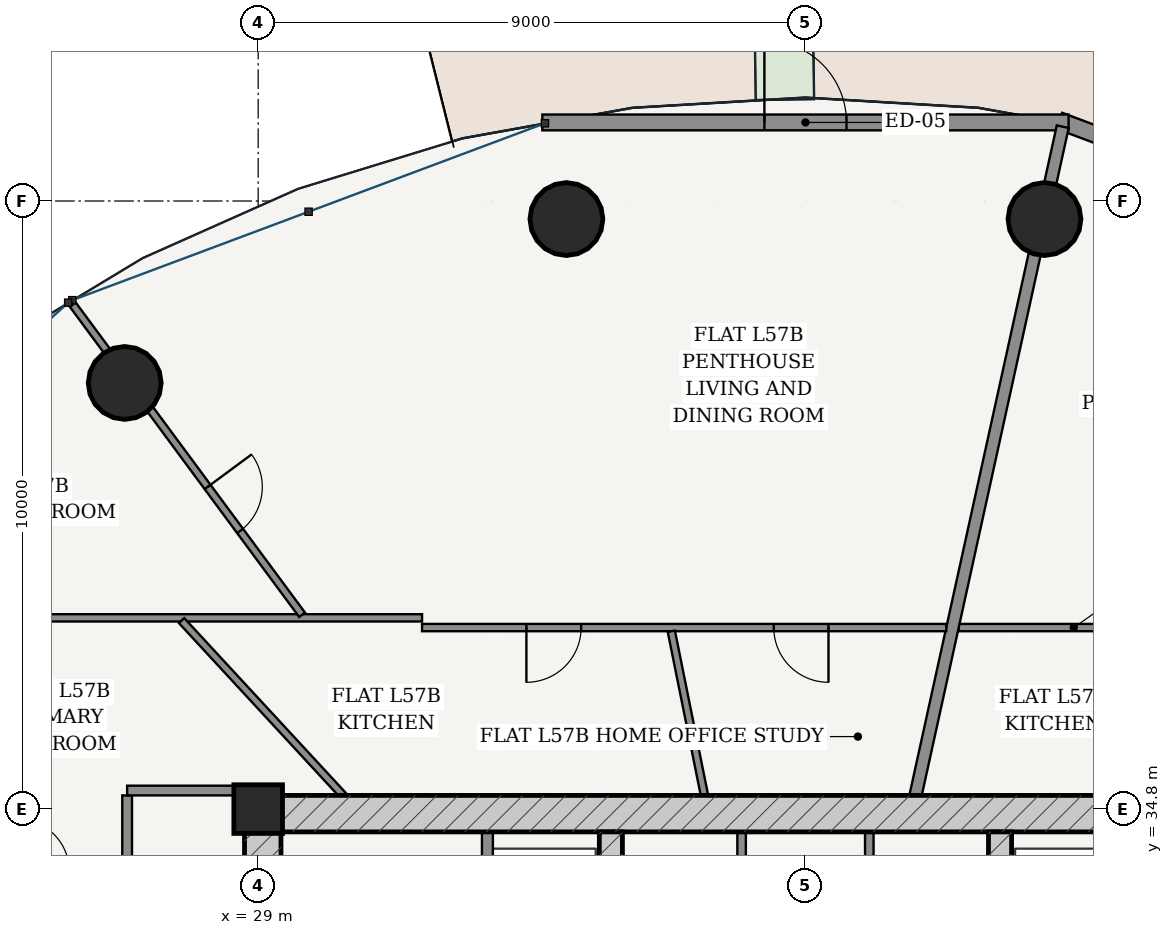
"""IFC4 building model, lengths in metres.
Left out: names, types, materials, properties, quantities, classifications, styles, units other than length and angle.
Written with IfcOpenShell. Run it as: python <this file> out.ifc"""

import sys

from ifc_helpers import new_model, si_unit, direction, frame, frame_2d, origin, origin_2d, place, context, subcontext, project, spatial, rectangle, hollow_circle, extrude, source, transform, mapped, element, fill, save


model = new_model("IFC4")
c1 = context("Model", 3, precision=1e-05, world=origin(), true_north=direction((-0.2419218956, 0.970295726276)))
c2 = subcontext(c1, "Body", "Model", "MODEL_VIEW")
j1 = project(units=[si_unit("LENGTHUNIT", "METRE"), si_unit("PLANEANGLEUNIT", "RADIAN")], contexts=[c1])
p1 = place(None, origin())
s1 = spatial("IfcSite", under=j1, at=p1, CompositionType="ELEMENT")
p2 = place(p1, origin())
s2 = spatial("IfcBuilding", under=s1, at=p2, CompositionType="ELEMENT")
p3 = place(p2, frame((0.0, 0.0, 217.1)))
s3 = spatial("IfcBuildingStorey", under=s2, at=p3, CompositionType="ELEMENT", Elevation=217.1)
p4 = place(p3, frame((29.0, 34.8, 0.0), z_axis=(0.0, 0.0, 1.0), x_axis=(1.0, 0.0, 0.0)))
e1 = element("IfcColumn", 1, at=p4, inside=s3, PredefinedType="COLUMN", context=c2, shape_type="SweptSolid", body=[
    extrude(rectangle(XDim=0.8, YDim=0.8, at=origin_2d()), origin(), (0.0, 0.0, 1.0), 3.7),
])
p5 = place(p3, frame((28.775, 34.725, 0.0), z_axis=(0.0, 0.0, 1.0), x_axis=(1.0, 0.0, 0.0)))
e2 = element("IfcWall", 2, at=p5, inside=s3, PredefinedType="SHEAR", context=c2, shape_type="SweptSolid", body=[
    extrude(rectangle(XDim=18.45, YDim=0.6, at=frame_2d((9.225, 0.0))), origin(), (0.0, 0.0, 1.0), 3.435),
])
p6 = place(p3, frame((29.075, 19.175, 0.0), z_axis=(0.0, 0.0, 1.0), x_axis=(0.0, 1.0, 0.0)))
e3 = element("IfcWall", 3, at=p6, inside=s3, PredefinedType="SHEAR", context=c2, shape_type="SweptSolid", body=[
    extrude(rectangle(XDim=15.25, YDim=0.6, at=frame_2d((7.625, 0.0))), origin(), (0.0, 0.0, 1.0), 3.435),
])
p7 = place(p6, frame((9.875, 0.0, 0.0)))
e4 = element("IfcOpeningElement", 4, at=p7, cuts=e3, PredefinedType="OPENING", context=c2, shape_type="SweptSolid", body=[
    extrude(rectangle(XDim=1.5, YDim=2.2, at=frame_2d((0.75, 1.1))), frame((0.0, 0.31, 0.0), z_axis=(0.0, -1.0, 0.0), x_axis=(1.0, 0.0, 0.0)), (0.0, 0.0, 1.0), 0.62),
])
p8 = place(p3, frame((34.8, 19.175, 0.0), z_axis=(0.0, 0.0, 1.0), x_axis=(0.0, 1.0, 0.0)))
e5 = element("IfcWall", 5, at=p8, inside=s3, PredefinedType="SHEAR", context=c2, shape_type="SweptSolid", body=[
    extrude(rectangle(XDim=15.25, YDim=0.38, at=frame_2d((7.625, 0.0))), origin(), (0.0, 0.0, 1.0), 3.435),
])
p9 = place(p8, frame((7.8, 0.0, 0.0)))
e6 = element("IfcOpeningElement", 6, at=p9, cuts=e5, PredefinedType="OPENING", context=c2, shape_type="SweptSolid", body=[
    extrude(rectangle(XDim=1.05, YDim=2.15, at=frame_2d((0.525, 1.075))), frame((0.0, 0.2, 0.0), z_axis=(0.0, -1.0, 0.0), x_axis=(1.0, 0.0, 0.0)), (0.0, 0.0, 1.0), 0.4),
])
p10 = place(p3, frame((41.2, 19.175, 0.0), z_axis=(0.0, 0.0, 1.0), x_axis=(0.0, 1.0, 0.0)))
e7 = element("IfcWall", 7, at=p10, inside=s3, PredefinedType="SHEAR", context=c2, shape_type="SweptSolid", body=[
    extrude(rectangle(XDim=15.25, YDim=0.38, at=frame_2d((7.625, 0.0))), origin(), (0.0, 0.0, 1.0), 3.435),
])
p11 = place(p10, frame((7.8, 0.0, 0.0)))
e8 = element("IfcOpeningElement", 8, at=p11, cuts=e7, PredefinedType="OPENING", context=c2, shape_type="SweptSolid", body=[
    extrude(rectangle(XDim=1.05, YDim=2.15, at=frame_2d((0.525, 1.075))), frame((0.0, 0.2, 0.0), z_axis=(0.0, -1.0, 0.0), x_axis=(1.0, 0.0, 0.0)), (0.0, 0.0, 1.0), 0.4),
])
for number, where, z_axis, x_axis in (
    (9, (41.931, 44.503, 0.0), (0.0, 0.0, 1.0), (1.0, 0.0, 0.0)),
    (10, (34.069, 44.503, 0.0), (0.0, 0.0, 1.0), (1.0, 0.0, 0.0)),
    (11, (26.805, 41.808, 0.0), (0.0, 0.0, 1.0), (1.0, 0.0, 0.0)),
):
    element("IfcColumn", number, at=place(p3, frame(where, z_axis=z_axis, x_axis=x_axis)), inside=s3, PredefinedType="COLUMN", context=c2, shape_type="SweptSolid", body=[
        extrude(hollow_circle(Radius=0.6, WallThickness=0.038, at=origin_2d()), origin(), (0.0, 0.0, 1.0), 3.7),
    ])
p12 = place(p3, frame((50.17, 43.127, 0.0), z_axis=(0.0, 0.0, 1.0), x_axis=(-0.936556918375, 0.350515532672, 0.0)))
e12 = element("IfcWall", 12, at=p12, inside=s3, PredefinedType="SOLIDWALL", context=c2, shape_type="SweptSolid", body=[
    extrude(rectangle(XDim=8.539, YDim=0.28, at=frame_2d((4.27, 0.0))), origin(), (0.0, 0.0, 1.0), 3.435),
])
p13 = place(p12, frame((1.256, 0.0, 0.85)))
e13 = element("IfcOpeningElement", 13, at=p13, cuts=e12, PredefinedType="OPENING", context=c2, shape_type="SweptSolid", body=[
    extrude(rectangle(XDim=2.1, YDim=1.95, at=frame_2d((1.05, 0.975))), frame((0.0, 0.15, 0.0), z_axis=(0.0, -1.0, 0.0), x_axis=(1.0, 0.0, 0.0)), (0.0, 0.0, 1.0), 0.3),
])
p14 = place(p12, frame((5.184, 0.0, 0.85)))
e14 = element("IfcOpeningElement", 14, at=p14, cuts=e12, PredefinedType="OPENING", context=c2, shape_type="SweptSolid", body=[
    extrude(rectangle(XDim=2.1, YDim=1.95, at=frame_2d((1.05, 0.975))), frame((0.0, 0.15, 0.0), z_axis=(0.0, -1.0, 0.0), x_axis=(1.0, 0.0, 0.0)), (0.0, 0.0, 1.0), 0.3),
])
p15 = place(p3, frame((42.327, 46.092, 0.0), z_axis=(0.0, 0.0, 1.0), x_axis=(-1.0, 0.0, 0.0)))
e15 = element("IfcWall", 15, at=p15, inside=s3, PredefinedType="SOLIDWALL", context=c2, shape_type="SweptSolid", body=[
    extrude(rectangle(XDim=8.654, YDim=0.26, at=frame_2d((4.327, 0.0))), origin(), (0.0, 0.0, 1.0), 3.435),
])
p16 = place(p15, frame((3.652, 0.0, 0.0)))
e16 = element("IfcOpeningElement", 16, at=p16, cuts=e15, PredefinedType="OPENING", context=c2, shape_type="SweptSolid", body=[
    extrude(rectangle(XDim=1.35, YDim=2.2, at=frame_2d((0.675, 1.1))), frame((0.0, 0.14, 0.0), z_axis=(0.0, -1.0, 0.0), x_axis=(1.0, 0.0, 0.0)), (0.0, 0.0, 1.0), 0.28),
])
p17 = place(p3, frame((32.77, 28.52, 0.0), z_axis=(0.0, 0.0, 1.0), x_axis=(0.0, 1.0, 0.0)))
e17 = element("IfcWall", 17, at=p17, inside=s3, PredefinedType="PARTITIONING", context=c2, shape_type="SweptSolid", body=[
    extrude(rectangle(XDim=5.905, YDim=0.18, at=frame_2d((2.953, 0.0))), origin(), (0.0, 0.0, 1.0), 3.435),
])
p18 = place(p17, frame((3.655, 0.0, 0.0)))
e18 = element("IfcOpeningElement", 18, at=p18, cuts=e17, PredefinedType="OPENING", context=c2, shape_type="SweptSolid", body=[
    extrude(rectangle(XDim=1.15, YDim=2.2, at=frame_2d((0.575, 1.1))), frame((0.0, 0.1, 0.0), z_axis=(0.0, -1.0, 0.0), x_axis=(1.0, 0.0, 0.0)), (0.0, 0.0, 1.0), 0.2),
])
p19 = place(p17, frame((0.73, 0.0, 0.0)))
e19 = element("IfcOpeningElement", 19, at=p19, cuts=e17, PredefinedType="OPENING", context=c2, shape_type="SweptSolid", body=[
    extrude(rectangle(XDim=1.2, YDim=2.25, at=frame_2d((0.6, 1.125))), frame((0.0, 0.1, 0.0), z_axis=(0.0, -1.0, 0.0), x_axis=(1.0, 0.0, 0.0)), (0.0, 0.0, 1.0), 0.2),
])
for number, where, z_axis, x_axis in (
    (20, (36.95, 28.56, 0.0), (0.0, 0.0, 1.0), (0.0, 1.0, 0.0)),
    (21, (39.05, 28.56, 0.0), (0.0, 0.0, 1.0), (0.0, 1.0, 0.0)),
):
    element("IfcWall", number, at=place(p3, frame(where, z_axis=z_axis, x_axis=x_axis)), inside=s3, PredefinedType="PARTITIONING", context=c2, shape_type="SweptSolid", body=[
        extrude(rectangle(XDim=5.865, YDim=0.14, at=frame_2d((2.933, 0.0))), origin(), (0.0, 0.0, 1.0), 3.435),
    ])
p20 = place(p3, frame((26.845, 24.4, 0.0), z_axis=(0.0, 0.0, 1.0), x_axis=(0.0, 1.0, 0.0)))
e22 = element("IfcWall", 22, at=p20, inside=s3, PredefinedType="PARTITIONING", context=c2, shape_type="SweptSolid", body=[
    extrude(rectangle(XDim=10.625, YDim=0.16, at=frame_2d((5.312, 0.0))), origin(), (0.0, 0.0, 1.0), 2.951),
])
p21 = place(p20, frame((4.936, 0.0, 0.0)))
e23 = element("IfcOpeningElement", 23, at=p21, cuts=e22, PredefinedType="OPENING", context=c2, shape_type="SweptSolid", body=[
    extrude(rectangle(XDim=0.98, YDim=2.2, at=frame_2d((0.49, 1.1))), frame((0.0, 0.09, 0.0), z_axis=(0.0, -1.0, 0.0), x_axis=(1.0, 0.0, 0.0)), (0.0, 0.0, 1.0), 0.18),
])
p22 = place(p3, frame((26.845, 35.105, 0.0), z_axis=(0.0, 0.0, 1.0), x_axis=(1.0, 0.0, 0.0)))
e24 = element("IfcWall", 24, at=p22, inside=s3, PredefinedType="PARTITIONING", context=c2, shape_type="SweptSolid", body=[
    extrude(rectangle(XDim=1.93, YDim=0.16, at=frame_2d((0.965, 0.0))), origin(), (0.0, 0.0, 1.0), 3.435),
])
p23 = place(p3, frame((40.52, 37.785, 0.0), z_axis=(0.0, 0.0, 1.0), x_axis=(1.0, 0.0, 0.0)))
e25 = element("IfcWall", 25, at=p23, inside=s3, PredefinedType="PARTITIONING", context=c2, shape_type="SweptSolid", body=[
    extrude(rectangle(XDim=3.785, YDim=0.12, at=frame_2d((1.893, 0.0))), origin(), (0.0, 0.0, 1.0), 2.951),
])
p24 = place(p3, frame((39.811, 35.027, 0.0), z_axis=(0.0, 0.0, 1.0), x_axis=(0.214966857327, 0.976621344356, 0.0)))
e26 = element("IfcWall", 26, at=p24, inside=s3, PredefinedType="PARTITIONING", context=c2, shape_type="SweptSolid", body=[
    extrude(rectangle(XDim=11.258, YDim=0.2, at=frame_2d((5.629, 0.0))), origin(), (0.0, 0.0, 1.0), 2.52),
])
p25 = place(p3, frame((24.005, 37.945, 0.0), z_axis=(0.0, 0.0, 1.0), x_axis=(1.0, 0.0, 0.0)))
e27 = element("IfcWall", 27, at=p25, inside=s3, PredefinedType="PARTITIONING", context=c2, shape_type="SweptSolid", body=[
    extrude(rectangle(XDim=7.69, YDim=0.12, at=frame_2d((3.845, 0.0))), origin(), (0.0, 0.0, 1.0), 2.951),
])
p26 = place(p3, frame((31.695, 37.785, 0.0), z_axis=(0.0, 0.0, 1.0), x_axis=(1.0, 0.0, 0.0)))
e28 = element("IfcWall", 28, at=p26, inside=s3, PredefinedType="PARTITIONING", context=c2, shape_type="SweptSolid", body=[
    extrude(rectangle(XDim=8.621, YDim=0.12, at=frame_2d((4.311, 0.0))), origin(), (0.0, 0.0, 1.0), 2.951),
])
p27 = place(p26, frame((1.716, 0.0, 0.0)))
e29 = element("IfcOpeningElement", 29, at=p27, cuts=e28, PredefinedType="OPENING", context=c2, shape_type="SweptSolid", body=[
    extrude(rectangle(XDim=0.9, YDim=2.15, at=frame_2d((0.45, 1.075))), frame((0.0, 0.07, 0.0), z_axis=(0.0, -1.0, 0.0), x_axis=(1.0, 0.0, 0.0)), (0.0, 0.0, 1.0), 0.14),
])
p28 = place(p26, frame((5.784, 0.0, 0.0)))
e30 = element("IfcOpeningElement", 30, at=p28, cuts=e28, PredefinedType="OPENING", context=c2, shape_type="SweptSolid", body=[
    extrude(rectangle(XDim=0.9, YDim=2.15, at=frame_2d((0.45, 1.075))), frame((0.0, 0.07, 0.0), z_axis=(0.0, -1.0, 0.0), x_axis=(1.0, 0.0, 0.0)), (0.0, 0.0, 1.0), 0.14),
])
p29 = place(p3, frame((29.722, 37.995, 0.0), z_axis=(0.0, 0.0, 1.0), x_axis=(-0.594518724985, 0.80408176552, 0.0)))
e31 = element("IfcWall", 31, at=p29, inside=s3, PredefinedType="PARTITIONING", context=c2, shape_type="SweptSolid", body=[
    extrude(rectangle(XDim=6.344, YDim=0.12, at=frame_2d((3.172, 0.0))), origin(), (0.0, 0.0, 1.0), 2.951),
])
p30 = place(p29, frame((1.715, 0.0, 0.0)))
e32 = element("IfcOpeningElement", 32, at=p30, cuts=e31, PredefinedType="OPENING", context=c2, shape_type="SweptSolid", body=[
    extrude(rectangle(XDim=0.9, YDim=2.15, at=frame_2d((0.45, 1.075))), frame((0.0, 0.07, 0.0), z_axis=(0.0, -1.0, 0.0), x_axis=(1.0, 0.0, 0.0)), (0.0, 0.0, 1.0), 0.14),
])
p31 = place(p3, frame((36.339, 35.027, 0.0), z_axis=(0.0, 0.0, 1.0), x_axis=(-0.197856196381, 0.980231057228, 0.0)))
e33 = element("IfcWall", 33, at=p31, inside=s3, PredefinedType="PARTITIONING", context=c2, shape_type="SweptSolid", body=[
    extrude(rectangle(XDim=2.752, YDim=0.12, at=frame_2d((1.376, 0.0))), origin(), (0.0, 0.0, 1.0), 2.52),
])
p32 = place(p3, frame((30.396, 35.026, 0.0), z_axis=(0.0, 0.0, 1.0), x_axis=(-0.678759446058, 0.734360684124, 0.0)))
e34 = element("IfcWall", 34, at=p32, inside=s3, PredefinedType="PARTITIONING", context=c2, shape_type="SweptSolid", body=[
    extrude(rectangle(XDim=3.912, YDim=0.12, at=frame_2d((1.956, 0.0))), origin(), (0.0, 0.0, 1.0), 2.951),
])
p33 = place(p3, frame((26.765, 32.845, 0.0), z_axis=(0.0, 0.0, 1.0), x_axis=(-0.88059355453, 0.473872336943, 0.0)))
e35 = element("IfcWall", 35, at=p33, inside=s3, PredefinedType="PARTITIONING", context=c2, shape_type="SweptSolid", body=[
    extrude(rectangle(XDim=3.072, YDim=0.12, at=frame_2d((1.536, 0.0))), origin(), (0.0, 0.0, 1.0), 3.11),
])
p34 = place(p33, frame((1.106, 0.0, 0.0)))
e36 = element("IfcOpeningElement", 36, at=p34, cuts=e35, PredefinedType="OPENING", context=c2, shape_type="SweptSolid", body=[
    extrude(rectangle(XDim=0.86, YDim=2.15, at=frame_2d((0.43, 1.075))), frame((0.0, 0.07, 0.0), z_axis=(0.0, -1.0, 0.0), x_axis=(1.0, 0.0, 0.0)), (0.0, 0.0, 1.0), 0.14),
])
m1 = source(origin(), c2, "Body", "SweptSolid", [
    extrude(rectangle(XDim=1.35, YDim=2.2, at=frame_2d((0.675, 1.1))), frame((0.0, 0.025, 0.0), z_axis=(0.0, -1.0, 0.0), x_axis=(1.0, 0.0, 0.0)), (0.0, 0.0, 1.0), 0.05),
])
p35 = place(p16, frame((1.35, 0.0, 0.0), z_axis=(0.0, 0.0, 1.0), x_axis=(-1.0, 0.0, 0.0)))
e37 = element("IfcDoor", 37, at=p35, inside=s3, OperationType="SINGLE_SWING_LEFT", PredefinedType="DOOR", context=c2, shape_type="MappedRepresentation", body=[
    mapped(m1, transform((0.0, 0.0, 0.0), scale=1.0)),
])
fill(e16, e37)
m2 = source(origin(), c2, "Body", "SweptSolid", [
    extrude(rectangle(XDim=0.9, YDim=2.15, at=frame_2d((0.45, 1.075))), frame((0.0, 0.025, 0.0), z_axis=(0.0, -1.0, 0.0), x_axis=(1.0, 0.0, 0.0)), (0.0, 0.0, 1.0), 0.05),
])
p36 = place(p30, frame((0.9, 0.0, 0.0), z_axis=(0.0, 0.0, 1.0), x_axis=(-1.0, 0.0, 0.0)))
e38 = element("IfcDoor", 38, at=p36, inside=s3, OperationType="SINGLE_SWING_LEFT", PredefinedType="DOOR", context=c2, shape_type="MappedRepresentation", body=[
    mapped(m2, transform((0.0, 0.0, 0.0), scale=1.0)),
])
fill(e32, e38)
p37 = place(p27, frame((0.9, 0.0, 0.0), z_axis=(0.0, 0.0, 1.0), x_axis=(-1.0, 0.0, 0.0)))
e39 = element("IfcDoor", 39, at=p37, inside=s3, OperationType="SINGLE_SWING_RIGHT", PredefinedType="DOOR", context=c2, shape_type="MappedRepresentation", body=[
    mapped(m2, transform((0.0, 0.0, 0.0), scale=1.0)),
])
fill(e29, e39)
p38 = place(p28, frame((0.9, 0.0, 0.0), z_axis=(0.0, 0.0, 1.0), x_axis=(-1.0, 0.0, 0.0)))
e40 = element("IfcDoor", 40, at=p38, inside=s3, OperationType="SINGLE_SWING_LEFT", PredefinedType="DOOR", context=c2, shape_type="MappedRepresentation", body=[
    mapped(m2, transform((0.0, 0.0, 0.0), scale=1.0)),
])
fill(e30, e40)
save(model, sys.argv[1])
